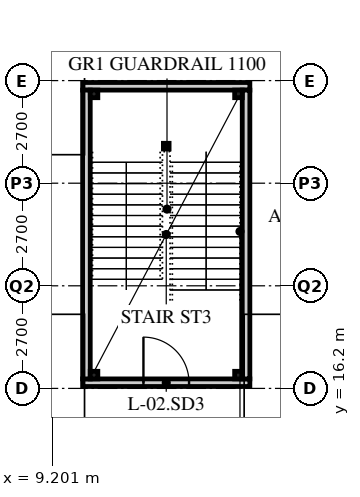
"""IFC4 building model, lengths in metres.
Left out: names, types, materials, properties, quantities, classifications, styles, units other than length and angle.
Written with IfcOpenShell. Run it as: python <this file> out.ifc"""

import sys

from ifc_helpers import new_model, si_unit, direction, frame, frame_2d, origin, origin_2d, place, context, subcontext, project, spatial, rectangle, hollow_rectangle, extrude, element, fill, save


model = new_model("IFC4")
c1 = context("Model", 3, precision=1e-05, world=origin(), true_north=direction((0.0, 1.0)))
c2 = subcontext(c1, "Body", "Model", "MODEL_VIEW")
j1 = project(units=[si_unit("LENGTHUNIT", "METRE"), si_unit("PLANEANGLEUNIT", "RADIAN")], contexts=[c1])
p1 = place(None, origin())
s1 = spatial("IfcSite", under=j1, at=p1, CompositionType="ELEMENT")
p2 = place(p1, origin())
s2 = spatial("IfcBuilding", under=s1, at=p2, CompositionType="ELEMENT")
p3 = place(p2, frame((0.0, 0.0, -8.4)))
s3 = spatial("IfcBuildingStorey", under=s2, at=p3, CompositionType="ELEMENT", Elevation=-8.4)
p4 = place(p3, frame((10.0, 16.35, 0.0), z_axis=(0.0, 0.0, 1.0), x_axis=(1.0, 0.0, 0.0)))
e1 = element("IfcWall", 1, at=p4, inside=s3, PredefinedType="SOLIDWALL", context=c2, shape_type="SweptSolid", body=[
    extrude(rectangle(XDim=4.4, YDim=0.2, at=frame_2d((2.2, 0.0))), origin(), (0.0, 0.0, 1.0), 3.338),
])
p5 = place(p4, frame((1.6, 0.0, 0.0)))
e2 = element("IfcOpeningElement", 2, at=p5, cuts=e1, PredefinedType="OPENING", context=c2, shape_type="SweptSolid", body=[
    extrude(rectangle(XDim=1.2, YDim=2.1, at=frame_2d((0.6, 1.05))), frame((0.0, 0.11, 0.0), z_axis=(0.0, -1.0, 0.0), x_axis=(1.0, 0.0, 0.0)), (0.0, 0.0, 1.0), 0.22),
])
p6 = place(p3, frame((10.0, 24.15, 0.0), z_axis=(0.0, 0.0, 1.0), x_axis=(1.0, 0.0, 0.0)))
e3 = element("IfcWall", 3, at=p6, inside=s3, PredefinedType="SOLIDWALL", context=c2, shape_type="SweptSolid", body=[
    extrude(rectangle(XDim=4.4, YDim=0.2, at=frame_2d((2.2, 0.0))), origin(), (0.0, 0.0, 1.0), 3.338),
])
for number, where, z_axis, x_axis in (
    (4, (10.1, 16.45, 0.0), (0.0, 0.0, 1.0), (0.0, 1.0, 0.0)),
    (5, (14.3, 16.45, 0.0), (0.0, 0.0, 1.0), (0.0, 1.0, 0.0)),
):
    element("IfcWall", number, at=place(p3, frame(where, z_axis=z_axis, x_axis=x_axis)), inside=s3, PredefinedType="SOLIDWALL", context=c2, shape_type="SweptSolid", body=[
        extrude(rectangle(XDim=7.6, YDim=0.2, at=frame_2d((3.8, 0.0))), origin(), (0.0, 0.0, 1.0), 3.95),
    ])
for number, where, z_axis, x_axis in (
    (6, (10.3, 23.95, 0.0), (0.0, 0.0, 1.0), (1.0, 0.0, 0.0)),
    (7, (14.1, 23.95, 0.0), (0.0, 0.0, 1.0), (1.0, 0.0, 0.0)),
    (8, (10.3, 16.55, 0.0), (0.0, 0.0, 1.0), (1.0, 0.0, 0.0)),
    (9, (14.1, 16.55, 0.0), (0.0, 0.0, 1.0), (1.0, 0.0, 0.0)),
):
    element("IfcColumn", number, at=place(p3, frame(where, z_axis=z_axis, x_axis=x_axis)), inside=s3, PredefinedType="COLUMN", context=c2, shape_type="SweptSolid", body=[
        extrude(hollow_rectangle(XDim=0.2, YDim=0.2, WallThickness=0.012, at=origin_2d()), origin(), (0.0, 0.0, 1.0), 4.2),
    ])
p7 = place(p3, frame((12.2, 22.575, 0.0), z_axis=(0.0, 0.0, 1.0), x_axis=(1.0, 0.0, 0.0)))
e10 = element("IfcColumn", 10, at=p7, inside=s3, PredefinedType="COLUMN", context=c2, shape_type="SweptSolid", body=[
    extrude(hollow_rectangle(XDim=0.15, YDim=0.15, WallThickness=0.01, at=origin_2d()), origin(), (0.0, 0.0, 1.0), 4.2),
])
p8 = place(p5, origin())
e11 = element("IfcDoor", 11, at=p8, inside=s3, OperationType="SINGLE_SWING_LEFT", PredefinedType="DOOR", context=c2, shape_type="SweptSolid", body=[
    extrude(rectangle(XDim=1.2, YDim=2.1, at=frame_2d((0.6, 1.05))), frame((0.0, 0.025, 0.0), z_axis=(0.0, -1.0, 0.0), x_axis=(1.0, 0.0, 0.0)), (0.0, 0.0, 1.0), 0.05),
])
fill(e2, e11)
save(model, sys.argv[1])
